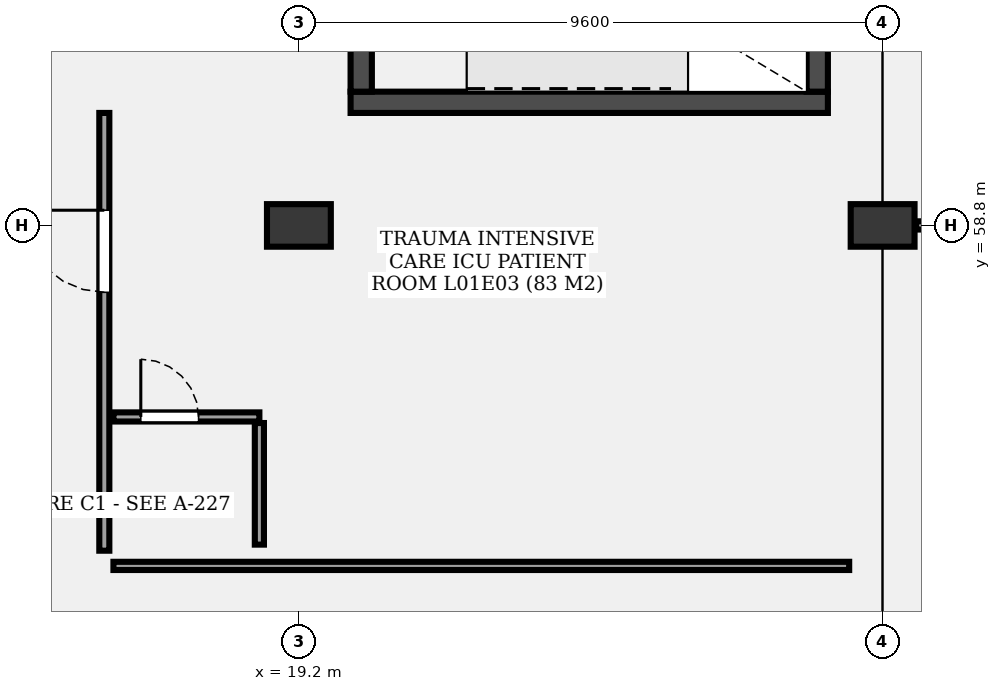
"""IFC4 building model, lengths in metres.
Left out: names, types, materials, properties, quantities, classifications, styles, units other than length and angle.
Written with IfcOpenShell. Run it as: python <this file> out.ifc"""

import sys

from ifc_helpers import new_model, si_unit, direction, frame, frame_2d, origin, origin_2d, place, context, subcontext, project, spatial, rectangle, extrude, element, fill, save


model = new_model("IFC4")
c1 = context("Model", 3, precision=1e-05, world=origin(), true_north=direction((0.0, 1.0)))
c2 = subcontext(c1, "Body", "Model", "MODEL_VIEW")
j1 = project(units=[si_unit("LENGTHUNIT", "METRE"), si_unit("PLANEANGLEUNIT", "RADIAN")], contexts=[c1])
p1 = place(None, origin())
s1 = spatial("IfcSite", under=j1, at=p1, CompositionType="ELEMENT")
p2 = place(p1, origin())
s2 = spatial("IfcBuilding", under=s1, at=p2, CompositionType="ELEMENT")
p3 = place(p2, frame((0.0, 0.0, 5.1)))
s3 = spatial("IfcBuildingStorey", under=s2, at=p3, CompositionType="ELEMENT", Elevation=5.1)
for number, where, z_axis, x_axis in (
    (1, (19.2, 58.8, 0.0), (0.0, 0.0, 1.0), (1.0, 0.0, 0.0)),
    (2, (28.8, 58.8, 0.0), (0.0, 0.0, 1.0), (1.0, 0.0, 0.0)),
):
    element("IfcColumn", number, at=place(p3, frame(where, z_axis=z_axis, x_axis=x_axis)), inside=s3, PredefinedType="COLUMN", context=c2, shape_type="SweptSolid", body=[
        extrude(rectangle(XDim=1.05, YDim=0.7, at=origin_2d()), origin(), (0.0, 0.0, 1.0), 4.8),
    ])
p4 = place(p3, frame((20.05, 60.825, 0.0), z_axis=(0.0, 0.0, 1.0), x_axis=(1.0, 0.0, 0.0)))
e3 = element("IfcWall", 3, at=p4, inside=s3, PredefinedType="SHEAR", context=c2, shape_type="SweptSolid", body=[
    extrude(rectangle(XDim=7.85, YDim=0.35, at=frame_2d((3.925, 0.0))), origin(), (0.0, 0.0, 1.0), 4.8),
])
p5 = place(p3, frame((27.725, 61.0, 0.0), z_axis=(0.0, 0.0, 1.0), x_axis=(0.0, 1.0, 0.0)))
e4 = element("IfcWall", 4, at=p5, inside=s3, PredefinedType="SHEAR", context=c2, shape_type="SweptSolid", body=[
    extrude(rectangle(XDim=3.36, YDim=0.35, at=frame_2d((1.68, 0.0))), origin(), (0.0, 0.0, 1.0), 4.8),
])
p6 = place(p3, frame((20.225, 64.36, 0.0), z_axis=(0.0, 0.0, 1.0), x_axis=(0.0, -1.0, 0.0)))
e5 = element("IfcWall", 5, at=p6, inside=s3, PredefinedType="SHEAR", context=c2, shape_type="SweptSolid", body=[
    extrude(rectangle(XDim=3.36, YDim=0.35, at=frame_2d((1.68, 0.0))), origin(), (0.0, 0.0, 1.0), 4.8),
])
p7 = place(p6, frame((1.08, 0.0, 0.0)))
e6 = element("IfcOpeningElement", 6, at=p7, cuts=e5, PredefinedType="OPENING", context=c2, shape_type="SweptSolid", body=[
    extrude(rectangle(XDim=1.2, YDim=2.2, at=frame_2d((0.6, 1.1))), frame((0.0, 0.185, 0.0), z_axis=(0.0, -1.0, 0.0), x_axis=(1.0, 0.0, 0.0)), (0.0, 0.0, 1.0), 0.37),
])
p8 = place(p3, frame((16.0, 53.45, 0.0), z_axis=(0.0, 0.0, 1.0), x_axis=(0.0, 1.0, 0.0)))
e7 = element("IfcWall", 7, at=p8, inside=s3, PredefinedType="PARTITIONING", context=c2, shape_type="SweptSolid", body=[
    extrude(rectangle(XDim=7.2, YDim=0.165, at=frame_2d((3.6, 0.0))), origin(), (0.0, 0.0, 1.0), 3.68),
])
p9 = place(p8, frame((4.25, 0.0, 0.0)))
e8 = element("IfcOpeningElement", 8, at=p9, cuts=e7, PredefinedType="OPENING", context=c2, shape_type="SweptSolid", body=[
    extrude(rectangle(XDim=1.35, YDim=2.4, at=frame_2d((0.675, 1.2))), frame((0.0, 0.093, 0.0), z_axis=(0.0, -1.0, 0.0), x_axis=(1.0, 0.0, 0.0)), (0.0, 0.0, 1.0), 0.185),
])
p10 = place(p3, frame((16.15, 55.65, 0.0), z_axis=(0.0, 0.0, 1.0), x_axis=(1.0, 0.0, 0.0)))
e9 = element("IfcWall", 9, at=p10, inside=s3, PredefinedType="PARTITIONING", context=c2, shape_type="SweptSolid", body=[
    extrude(rectangle(XDim=2.4, YDim=0.15, at=frame_2d((1.2, 0.0))), origin(), (0.0, 0.0, 1.0), 3.68),
])
p11 = place(p10, frame((0.45, 0.0, 0.0)))
e10 = element("IfcOpeningElement", 10, at=p11, cuts=e9, PredefinedType="OPENING", context=c2, shape_type="SweptSolid", body=[
    extrude(rectangle(XDim=0.95, YDim=2.1, at=frame_2d((0.475, 1.05))), frame((0.0, 0.085, 0.0), z_axis=(0.0, -1.0, 0.0), x_axis=(1.0, 0.0, 0.0)), (0.0, 0.0, 1.0), 0.17),
])
p12 = place(p3, frame((18.55, 53.55, 0.0), z_axis=(0.0, 0.0, 1.0), x_axis=(0.0, 1.0, 0.0)))
e11 = element("IfcWall", 11, at=p12, inside=s3, PredefinedType="PARTITIONING", context=c2, shape_type="SweptSolid", body=[
    extrude(rectangle(XDim=2.0, YDim=0.15, at=frame_2d((1.0, 0.0))), origin(), (0.0, 0.0, 1.0), 3.68),
])
p13 = place(p3, frame((16.15, 53.2, 0.0), z_axis=(0.0, 0.0, 1.0), x_axis=(1.0, 0.0, 0.0)))
e12 = element("IfcWall", 12, at=p13, inside=s3, PredefinedType="PARTITIONING", context=c2, shape_type="SweptSolid", body=[
    extrude(rectangle(XDim=12.1, YDim=0.135, at=frame_2d((6.05, 0.0))), origin(), (0.0, 0.0, 1.0), 3.68),
])
p14 = place(p3, frame((29.35, 58.8, 0.0), z_axis=(0.0, 0.0, 1.0), x_axis=(1.0, 0.0, 0.0)))
e13 = element("IfcWall", 13, at=p14, inside=s3, PredefinedType="PARTITIONING", context=c2, shape_type="SweptSolid", body=[
    extrude(rectangle(XDim=12.1, YDim=0.135, at=frame_2d((6.05, 0.0))), origin(), (0.0, 0.0, 1.0), 3.68),
])
p15 = place(p9, origin())
e14 = element("IfcDoor", 14, at=p15, inside=s3, OperationType="SINGLE_SWING_RIGHT", PredefinedType="DOOR", context=c2, shape_type="SweptSolid", body=[
    extrude(rectangle(XDim=1.35, YDim=2.4, at=frame_2d((0.675, 1.2))), frame((0.0, 0.025, 0.0), z_axis=(0.0, -1.0, 0.0), x_axis=(1.0, 0.0, 0.0)), (0.0, 0.0, 1.0), 0.05),
])
fill(e8, e14)
p16 = place(p11, origin())
e15 = element("IfcDoor", 15, at=p16, inside=s3, OperationType="SINGLE_SWING_LEFT", PredefinedType="DOOR", context=c2, shape_type="SweptSolid", body=[
    extrude(rectangle(XDim=0.95, YDim=2.1, at=frame_2d((0.475, 1.05))), frame((0.0, 0.025, 0.0), z_axis=(0.0, -1.0, 0.0), x_axis=(1.0, 0.0, 0.0)), (0.0, 0.0, 1.0), 0.05),
])
fill(e10, e15)
save(model, sys.argv[1])
